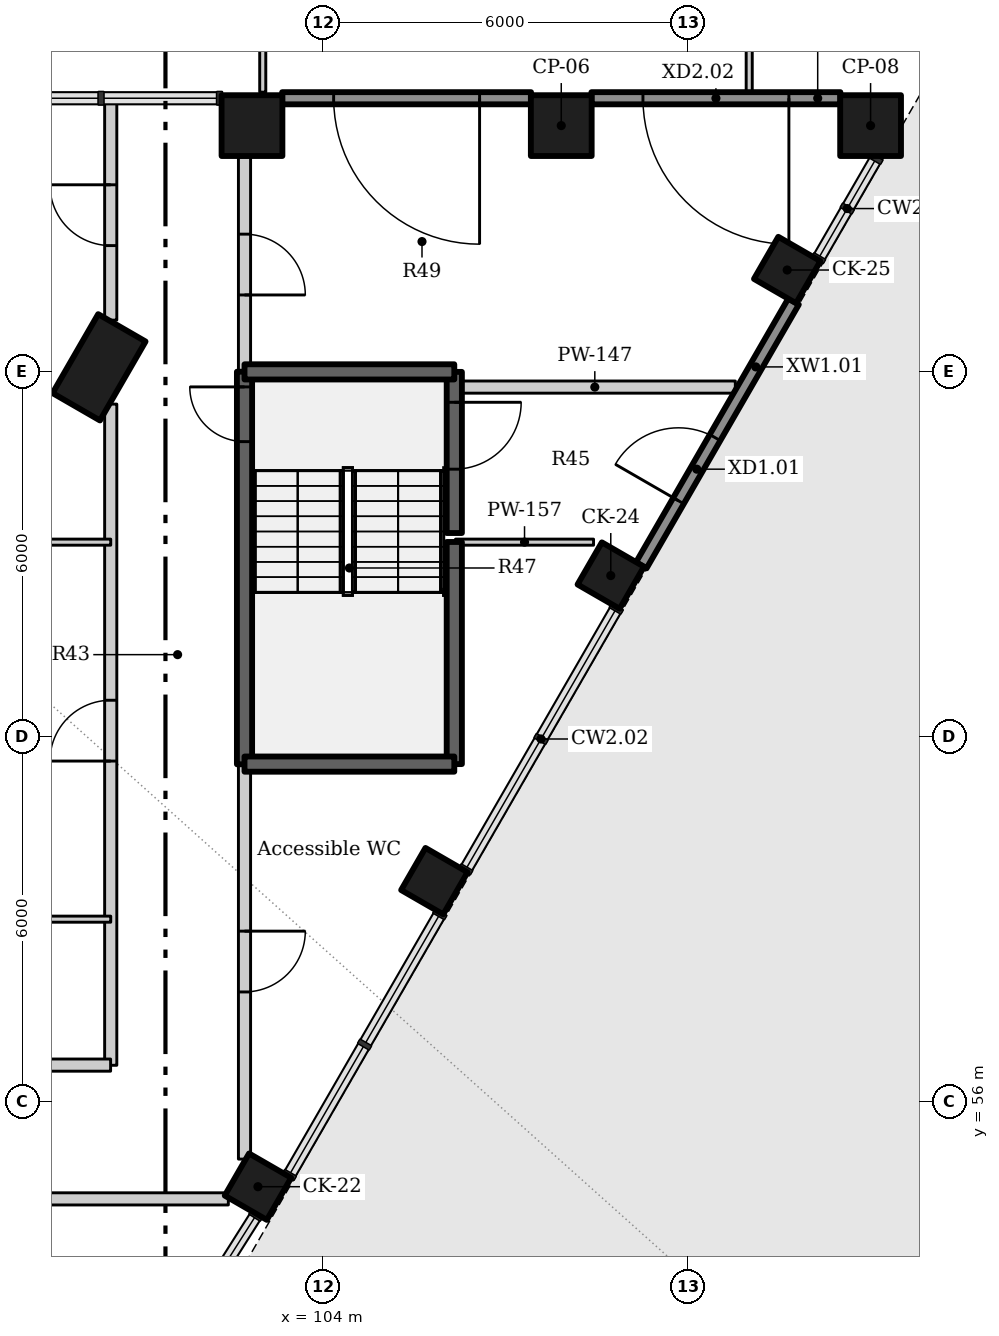
"""IFC4 building model, lengths in metres.
Left out: names, types, materials, properties, quantities, classifications, styles, units other than length and angle.
Written with IfcOpenShell. Run it as: python <this file> out.ifc"""

import sys

from ifc_helpers import new_model, si_unit, direction, frame, frame_2d, origin, origin_2d, place, context, subcontext, project, spatial, rectangle, extrude, element, fill, save


model = new_model("IFC4")
c1 = context("Model", 3, precision=1e-05, world=origin(), true_north=direction((0.0, 1.0)))
c2 = subcontext(c1, "Body", "Model", "MODEL_VIEW")
j1 = project(units=[si_unit("LENGTHUNIT", "METRE"), si_unit("PLANEANGLEUNIT", "RADIAN")], contexts=[c1])
p1 = place(None, origin())
s1 = spatial("IfcSite", under=j1, at=p1, CompositionType="ELEMENT")
p2 = place(p1, origin())
s2 = spatial("IfcBuilding", under=s1, at=p2, CompositionType="ELEMENT")
p3 = place(p2, origin())
s3 = spatial("IfcBuildingStorey", under=s2, at=p3, CompositionType="ELEMENT", Elevation=0.0)
p4 = place(p3, frame((100.308, 68.075, -1.8), z_axis=(0.0, 0.0, 1.0), x_axis=(0.5, 0.866025403784, 0.0)))
e1 = element("IfcColumn", 1, at=p4, inside=s3, PredefinedType="COLUMN", context=c2, shape_type="SweptSolid", body=[
    extrude(rectangle(XDim=1.5, YDim=0.9, at=origin_2d()), origin(), (0.0, 0.0, 1.0), 8.4),
])
for number, where, z_axis, x_axis in (
    (2, (102.921, 54.6, -1.8), (0.0, 0.0, 1.0), (0.5, 0.866, 0.0)),
    (3, (105.822, 59.625, -1.8), (0.0, 0.0, 1.0), (0.5, 0.866, 0.0)),
    (4, (108.723, 64.65, -1.8), (0.0, 0.0, 1.0), (0.5, 0.866, 0.0)),
    (5, (111.625, 69.675, -1.8), (0.0, 0.0, 1.0), (0.5, 0.866, 0.0)),
):
    element("IfcColumn", number, at=place(p3, frame(where, z_axis=z_axis, x_axis=x_axis)), inside=s3, PredefinedType="COLUMN", context=c2, shape_type="SweptSolid", body=[
        extrude(rectangle(XDim=0.8, YDim=0.8, at=origin_2d()), origin(), (0.0, 0.0, 1.0), 8.4),
    ])
for number, where, z_axis, x_axis in (
    (6, (102.823, 72.05, -1.8), (0.0, 0.0, 1.0), (1.0, 0.0, 0.0)),
    (7, (107.909, 72.05, -1.8), (0.0, 0.0, 1.0), (1.0, 0.0, 0.0)),
    (8, (112.996, 72.05, -1.8), (0.0, 0.0, 1.0), (1.0, 0.0, 0.0)),
):
    element("IfcColumn", number, at=place(p3, frame(where, z_axis=z_axis, x_axis=x_axis)), inside=s3, PredefinedType="COLUMN", context=c2, shape_type="SweptSolid", body=[
        extrude(rectangle(XDim=1.0, YDim=1.0, at=origin_2d()), origin(), (0.0, 0.0, 1.0), 8.4),
    ])
p5 = place(p3, frame((109.224, 64.818, 0.0), z_axis=(0.0, 0.0, 1.0), x_axis=(0.499990997566, 0.86603060128, 0.0)))
e9 = element("IfcWall", 9, at=p5, inside=s3, PredefinedType="SOLIDWALL", context=c2, shape_type="SweptSolid", body=[
    extrude(rectangle(XDim=5.01, YDim=0.2, at=frame_2d((2.505, 0.0))), origin(), (0.0, 0.0, 1.0), 5.4),
])
p6 = place(p5, frame((1.227, 0.0, 0.0)))
e10 = element("IfcOpeningElement", 10, at=p6, cuts=e9, PredefinedType="OPENING", context=c2, shape_type="SweptSolid", body=[
    extrude(rectangle(XDim=1.2, YDim=2.4, at=frame_2d((0.6, 1.2))), frame((0.0, 0.11, 0.0), z_axis=(0.0, -1.0, 0.0), x_axis=(1.0, 0.0, 0.0)), (0.0, 0.0, 1.0), 0.22),
])
p7 = place(p3, frame((112.5, 72.5, 0.0), z_axis=(0.0, 0.0, 1.0), x_axis=(-1.0, 0.0, 0.0)))
e11 = element("IfcWall", 11, at=p7, inside=s3, PredefinedType="SOLIDWALL", context=c2, shape_type="SweptSolid", body=[
    extrude(rectangle(XDim=4.095, YDim=0.2, at=frame_2d((2.047, 0.0))), origin(), (0.0, 0.0, 1.0), 5.4),
])
p8 = place(p7, frame((0.847, 0.0, 0.0)))
e12 = element("IfcOpeningElement", 12, at=p8, cuts=e11, PredefinedType="OPENING", context=c2, shape_type="SweptSolid", body=[
    extrude(rectangle(XDim=2.4, YDim=2.7, at=frame_2d((1.2, 1.35))), frame((0.0, 0.11, 0.0), z_axis=(0.0, -1.0, 0.0), x_axis=(1.0, 0.0, 0.0)), (0.0, 0.0, 1.0), 0.22),
])
p9 = place(p3, frame((107.413, 72.5, 0.0), z_axis=(0.0, 0.0, 1.0), x_axis=(-1.0, 0.0, 0.0)))
e13 = element("IfcWall", 13, at=p9, inside=s3, PredefinedType="SOLIDWALL", context=c2, shape_type="SweptSolid", body=[
    extrude(rectangle(XDim=4.094, YDim=0.2, at=frame_2d((2.047, 0.0))), origin(), (0.0, 0.0, 1.0), 5.4),
])
p10 = place(p9, frame((0.847, 0.0, 0.0)))
e14 = element("IfcOpeningElement", 14, at=p10, cuts=e13, PredefinedType="OPENING", context=c2, shape_type="SweptSolid", body=[
    extrude(rectangle(XDim=2.4, YDim=2.7, at=frame_2d((1.2, 1.35))), frame((0.0, 0.11, 0.0), z_axis=(0.0, -1.0, 0.0), x_axis=(1.0, 0.0, 0.0)), (0.0, 0.0, 1.0), 0.22),
])
p11 = place(p3, frame((102.7, 61.547, -1.8), z_axis=(0.0, 0.0, 1.0), x_axis=(0.0, 1.0, 0.0)))
e15 = element("IfcWall", 15, at=p11, inside=s3, PredefinedType="SHEAR", context=c2, shape_type="SweptSolid", body=[
    extrude(rectangle(XDim=6.456, YDim=0.25, at=frame_2d((3.228, 0.0))), origin(), (0.0, 0.0, 1.0), 8.1),
])
p12 = place(p11, frame((5.306, 0.0, 1.8)))
e16 = element("IfcOpeningElement", 16, at=p12, cuts=e15, PredefinedType="OPENING", context=c2, shape_type="SweptSolid", body=[
    extrude(rectangle(XDim=0.9, YDim=2.1, at=frame_2d((0.45, 1.05))), frame((0.0, 0.135, 0.0), z_axis=(0.0, -1.0, 0.0), x_axis=(1.0, 0.0, 0.0)), (0.0, 0.0, 1.0), 0.27),
])
p13 = place(p3, frame((102.7, 61.553, 0.0), z_axis=(0.0, 0.0, 1.0), x_axis=(0.0, -1.0, 0.0)))
e17 = element("IfcWall", 17, at=p13, inside=s3, PredefinedType="PARTITIONING", context=c2, shape_type="SweptSolid", body=[
    extrude(rectangle(XDim=6.499, YDim=0.2, at=frame_2d((3.249, 0.0))), origin(), (0.0, 0.0, 1.0), 6.3),
])
p14 = place(p13, frame((2.75, 0.0, 0.0)))
e18 = element("IfcOpeningElement", 18, at=p14, cuts=e17, PredefinedType="OPENING", context=c2, shape_type="SweptSolid", body=[
    extrude(rectangle(XDim=1.0, YDim=2.1, at=frame_2d((0.5, 1.05))), frame((0.0, 0.11, 0.0), z_axis=(0.0, -1.0, 0.0), x_axis=(1.0, 0.0, 0.0)), (0.0, 0.0, 1.0), 0.22),
])
p15 = place(p3, frame((102.7, 71.533, 0.0), z_axis=(0.0, 0.0, 1.0), x_axis=(0.0, -1.0, 0.0)))
e19 = element("IfcWall", 19, at=p15, inside=s3, PredefinedType="PARTITIONING", context=c2, shape_type="SweptSolid", body=[
    extrude(rectangle(XDim=3.536, YDim=0.2, at=frame_2d((1.768, 0.0))), origin(), (0.0, 0.0, 1.0), 6.3),
])
p16 = place(p15, frame((1.268, 0.0, 0.0)))
e20 = element("IfcOpeningElement", 20, at=p16, cuts=e19, PredefinedType="OPENING", context=c2, shape_type="SweptSolid", body=[
    extrude(rectangle(XDim=1.0, YDim=2.1, at=frame_2d((0.5, 1.05))), frame((0.0, 0.11, 0.0), z_axis=(0.0, -1.0, 0.0), x_axis=(1.0, 0.0, 0.0)), (0.0, 0.0, 1.0), 0.22),
])
p17 = place(p3, frame((100.5, 56.597, 0.0), z_axis=(0.0, 0.0, 1.0), x_axis=(0.0, 1.0, 0.0)))
e21 = element("IfcWall", 21, at=p17, inside=s3, PredefinedType="PARTITIONING", context=c2, shape_type="SweptSolid", body=[
    extrude(rectangle(XDim=10.873, YDim=0.2, at=frame_2d((5.437, 0.0))), origin(), (0.0, 0.0, 1.0), 6.3),
])
p18 = place(p17, frame((5.003, 0.0, 0.0)))
e22 = element("IfcOpeningElement", 22, at=p18, cuts=e21, PredefinedType="OPENING", context=c2, shape_type="SweptSolid", body=[
    extrude(rectangle(XDim=1.0, YDim=2.1, at=frame_2d((0.5, 1.05))), frame((0.0, 0.11, 0.0), z_axis=(0.0, -1.0, 0.0), x_axis=(1.0, 0.0, 0.0)), (0.0, 0.0, 1.0), 0.22),
])
p19 = place(p3, frame((100.5, 68.851, 0.0), z_axis=(0.0, 0.0, 1.0), x_axis=(0.0, 1.0, 0.0)))
e23 = element("IfcWall", 23, at=p19, inside=s3, PredefinedType="PARTITIONING", context=c2, shape_type="SweptSolid", body=[
    extrude(rectangle(XDim=3.569, YDim=0.2, at=frame_2d((1.785, 0.0))), origin(), (0.0, 0.0, 1.0), 5.53),
])
p20 = place(p19, frame((1.226, 0.0, 0.0)))
e24 = element("IfcOpeningElement", 24, at=p20, cuts=e23, PredefinedType="OPENING", context=c2, shape_type="SweptSolid", body=[
    extrude(rectangle(XDim=1.0, YDim=2.1, at=frame_2d((0.5, 1.05))), frame((0.0, 0.11, 0.0), z_axis=(0.0, -1.0, 0.0), x_axis=(1.0, 0.0, 0.0)), (0.0, 0.0, 1.0), 0.22),
])
p21 = place(p3, frame((106.15, 61.55, -1.8), z_axis=(0.0, 0.0, 1.0), x_axis=(0.0, 1.0, 0.0)))
e25 = element("IfcWall", 25, at=p21, inside=s3, PredefinedType="SHEAR", context=c2, shape_type="SweptSolid", body=[
    extrude(rectangle(XDim=3.653, YDim=0.25, at=frame_2d((1.826, 0.0))), origin(), (0.0, 0.0, 1.0), 8.1),
])
p22 = place(p3, frame((106.15, 68.0, -1.8), z_axis=(0.0, 0.0, 1.0), x_axis=(0.0, -1.0, 0.0)))
e26 = element("IfcWall", 26, at=p22, inside=s3, PredefinedType="SHEAR", context=c2, shape_type="SweptSolid", body=[
    extrude(rectangle(XDim=2.65, YDim=0.25, at=frame_2d((1.325, 0.0))), origin(), (0.0, 0.0, 1.0), 8.1),
])
p23 = place(p22, frame((0.5, 0.0, 1.8)))
e27 = element("IfcOpeningElement", 27, at=p23, cuts=e26, PredefinedType="OPENING", context=c2, shape_type="SweptSolid", body=[
    extrude(rectangle(XDim=1.1, YDim=2.1, at=frame_2d((0.55, 1.05))), frame((0.0, 0.135, 0.0), z_axis=(0.0, -1.0, 0.0), x_axis=(1.0, 0.0, 0.0)), (0.0, 0.0, 1.0), 0.27),
])
p24 = place(p3, frame((102.434, 54.4, 0.0), z_axis=(0.0, 0.0, 1.0), x_axis=(-1.0, 0.0, 0.0)))
e28 = element("IfcWall", 28, at=p24, inside=s3, PredefinedType="PARTITIONING", context=c2, shape_type="SweptSolid", body=[
    extrude(rectangle(XDim=20.834, YDim=0.2, at=frame_2d((10.417, 0.0))), origin(), (0.0, 0.0, 1.0), 6.3),
])
p25 = place(p24, frame((8.383, 0.0, 0.0)))
e29 = element("IfcOpeningElement", 29, at=p25, cuts=e28, PredefinedType="OPENING", context=c2, shape_type="SweptSolid", body=[
    extrude(rectangle(XDim=1.0, YDim=2.1, at=frame_2d((0.5, 1.05))), frame((0.0, 0.11, 0.0), z_axis=(0.0, -1.0, 0.0), x_axis=(1.0, 0.0, 0.0)), (0.0, 0.0, 1.0), 0.22),
])
p26 = place(p3, frame((91.274, 56.6, 0.0), z_axis=(0.0, 0.0, 1.0), x_axis=(1.0, 0.0, 0.0)))
e30 = element("IfcWall", 30, at=p26, inside=s3, PredefinedType="PARTITIONING", context=c2, shape_type="SweptSolid", body=[
    extrude(rectangle(XDim=9.224, YDim=0.2, at=frame_2d((4.612, 0.0))), origin(), (0.0, 0.0, 1.0), 6.3),
])
p27 = place(p26, frame((4.114, 0.0, 0.0)))
e31 = element("IfcOpeningElement", 31, at=p27, cuts=e30, PredefinedType="OPENING", context=c2, shape_type="SweptSolid", body=[
    extrude(rectangle(XDim=1.0, YDim=2.1, at=frame_2d((0.5, 1.05))), frame((0.0, 0.11, 0.0), z_axis=(0.0, -1.0, 0.0), x_axis=(1.0, 0.0, 0.0)), (0.0, 0.0, 1.0), 0.22),
])
p28 = place(p3, frame((106.15, 67.75, 0.0), z_axis=(0.0, 0.0, 1.0), x_axis=(1.0, 0.0, 0.0)))
e32 = element("IfcWall", 32, at=p28, inside=s3, PredefinedType="PARTITIONING", context=c2, shape_type="SweptSolid", body=[
    extrude(rectangle(XDim=4.622, YDim=0.2, at=frame_2d((2.311, 0.0))), origin(), (0.0, 0.0, 1.0), 5.53),
])
for number, where, z_axis, x_axis in (
    (33, (102.7, 68.0, -1.8), (0.0, 0.0, 1.0), (1.0, 0.0, 0.0)),
    (34, (102.7, 61.55, -1.8), (0.0, 0.0, 1.0), (1.0, 0.0, 0.0)),
):
    element("IfcWall", number, at=place(p3, frame(where, z_axis=z_axis, x_axis=x_axis)), inside=s3, PredefinedType="SHEAR", context=c2, shape_type="SweptSolid", body=[
        extrude(rectangle(XDim=3.45, YDim=0.25, at=frame_2d((1.725, 0.0))), origin(), (0.0, 0.0, 1.0), 8.1),
    ])
p29 = place(p3, frame((97.68, 65.2, 0.0), z_axis=(0.0, 0.0, 1.0), x_axis=(1.0, 0.0, 0.0)))
e35 = element("IfcWall", 35, at=p29, inside=s3, PredefinedType="PARTITIONING", context=c2, shape_type="SweptSolid", body=[
    extrude(rectangle(XDim=2.82, YDim=0.1, at=frame_2d((1.41, 0.0))), origin(), (0.0, 0.0, 1.0), 5.38),
])
p30 = place(p3, frame((106.17, 65.2, 0.0), z_axis=(0.0, 0.0, 1.0), x_axis=(1.0, 0.0, 0.0)))
e36 = element("IfcWall", 36, at=p30, inside=s3, PredefinedType="PARTITIONING", context=c2, shape_type="SweptSolid", body=[
    extrude(rectangle(XDim=2.27, YDim=0.1, at=frame_2d((1.135, 0.0))), origin(), (0.0, 0.0, 1.0), 6.3),
])
p31 = place(p3, frame((95.612, 59.0, 0.0), z_axis=(0.0, 0.0, 1.0), x_axis=(1.0, 0.0, 0.0)))
e37 = element("IfcWall", 37, at=p31, inside=s3, PredefinedType="PARTITIONING", context=c2, shape_type="SweptSolid", body=[
    extrude(rectangle(XDim=4.888, YDim=0.1, at=frame_2d((2.444, 0.0))), origin(), (0.0, 0.0, 1.0), 6.3),
])
p32 = place(p3, frame((103.0, 87.4, 0.0), z_axis=(0.0, 0.0, 1.0), x_axis=(0.0, -1.0, 0.0)))
e38 = element("IfcWall", 38, at=p32, inside=s3, PredefinedType="PARTITIONING", context=c2, shape_type="SweptSolid", body=[
    extrude(rectangle(XDim=14.8, YDim=0.1, at=frame_2d((7.4, 0.0))), origin(), (0.0, 0.0, 1.0), 6.3),
])
p33 = place(p32, frame((6.65, 0.0, 0.0)))
e39 = element("IfcOpeningElement", 39, at=p33, cuts=e38, PredefinedType="OPENING", context=c2, shape_type="SweptSolid", body=[
    extrude(rectangle(XDim=1.5, YDim=2.1, at=frame_2d((0.75, 1.05))), frame((0.0, 0.06, 0.0), z_axis=(0.0, -1.0, 0.0), x_axis=(1.0, 0.0, 0.0)), (0.0, 0.0, 1.0), 0.12),
])
p34 = place(p3, frame((111.0, 87.4, 0.0), z_axis=(0.0, 0.0, 1.0), x_axis=(0.0, -1.0, 0.0)))
e40 = element("IfcWall", 40, at=p34, inside=s3, PredefinedType="PARTITIONING", context=c2, shape_type="SweptSolid", body=[
    extrude(rectangle(XDim=14.8, YDim=0.1, at=frame_2d((7.4, 0.0))), origin(), (0.0, 0.0, 1.0), 6.3),
])
p35 = place(p34, frame((6.65, 0.0, 0.0)))
e41 = element("IfcOpeningElement", 41, at=p35, cuts=e40, PredefinedType="OPENING", context=c2, shape_type="SweptSolid", body=[
    extrude(rectangle(XDim=1.5, YDim=2.1, at=frame_2d((0.75, 1.05))), frame((0.0, 0.06, 0.0), z_axis=(0.0, -1.0, 0.0), x_axis=(1.0, 0.0, 0.0)), (0.0, 0.0, 1.0), 0.12),
])
p36 = place(p6, frame((1.2, 0.0, 0.0), z_axis=(0.0, 0.0, 1.0), x_axis=(-1.0, 0.0, 0.0)))
e42 = element("IfcDoor", 42, at=p36, inside=s3, OperationType="SINGLE_SWING_LEFT", PredefinedType="DOOR", context=c2, shape_type="SweptSolid", body=[
    extrude(rectangle(XDim=1.2, YDim=2.4, at=frame_2d((0.6, 1.2))), frame((0.0, 0.025, 0.0), z_axis=(0.0, -1.0, 0.0), x_axis=(1.0, 0.0, 0.0)), (0.0, 0.0, 1.0), 0.05),
])
fill(e10, e42)
p37 = place(p8, origin())
e43 = element("IfcDoor", 43, at=p37, inside=s3, OperationType="DOUBLE_DOOR_DOUBLE_SWING", PredefinedType="DOOR", context=c2, shape_type="SweptSolid", body=[
    extrude(rectangle(XDim=2.4, YDim=2.7, at=frame_2d((1.2, 1.35))), frame((0.0, 0.025, 0.0), z_axis=(0.0, -1.0, 0.0), x_axis=(1.0, 0.0, 0.0)), (0.0, 0.0, 1.0), 0.05),
])
fill(e12, e43)
p38 = place(p10, origin())
e44 = element("IfcDoor", 44, at=p38, inside=s3, OperationType="DOUBLE_DOOR_DOUBLE_SWING", PredefinedType="DOOR", context=c2, shape_type="SweptSolid", body=[
    extrude(rectangle(XDim=2.4, YDim=2.7, at=frame_2d((1.2, 1.35))), frame((0.0, 0.025, 0.0), z_axis=(0.0, -1.0, 0.0), x_axis=(1.0, 0.0, 0.0)), (0.0, 0.0, 1.0), 0.05),
])
fill(e14, e44)
p39 = place(p23, origin())
e45 = element("IfcDoor", 45, at=p39, inside=s3, OperationType="SINGLE_SWING_LEFT", PredefinedType="DOOR", context=c2, shape_type="SweptSolid", body=[
    extrude(rectangle(XDim=1.1, YDim=2.1, at=frame_2d((0.55, 1.05))), frame((0.0, 0.025, 0.0), z_axis=(0.0, -1.0, 0.0), x_axis=(1.0, 0.0, 0.0)), (0.0, 0.0, 1.0), 0.05),
])
fill(e27, e45)
p40 = place(p12, origin())
e46 = element("IfcDoor", 46, at=p40, inside=s3, OperationType="SINGLE_SWING_RIGHT", PredefinedType="DOOR", context=c2, shape_type="SweptSolid", body=[
    extrude(rectangle(XDim=0.9, YDim=2.1, at=frame_2d((0.45, 1.05))), frame((0.0, 0.025, 0.0), z_axis=(0.0, -1.0, 0.0), x_axis=(1.0, 0.0, 0.0)), (0.0, 0.0, 1.0), 0.05),
])
fill(e16, e46)
p41 = place(p16, origin())
e47 = element("IfcDoor", 47, at=p41, inside=s3, OperationType="SINGLE_SWING_RIGHT", PredefinedType="DOOR", context=c2, shape_type="SweptSolid", body=[
    extrude(rectangle(XDim=1.0, YDim=2.1, at=frame_2d((0.5, 1.05))), frame((0.0, 0.025, 0.0), z_axis=(0.0, -1.0, 0.0), x_axis=(1.0, 0.0, 0.0)), (0.0, 0.0, 1.0), 0.05),
])
fill(e20, e47)
p42 = place(p14, origin())
e48 = element("IfcDoor", 48, at=p42, inside=s3, OperationType="SINGLE_SWING_LEFT", PredefinedType="DOOR", context=c2, shape_type="SweptSolid", body=[
    extrude(rectangle(XDim=1.0, YDim=2.1, at=frame_2d((0.5, 1.05))), frame((0.0, 0.025, 0.0), z_axis=(0.0, -1.0, 0.0), x_axis=(1.0, 0.0, 0.0)), (0.0, 0.0, 1.0), 0.05),
])
fill(e18, e48)
p43 = place(p20, origin())
e49 = element("IfcDoor", 49, at=p43, inside=s3, OperationType="SINGLE_SWING_RIGHT", PredefinedType="DOOR", context=c2, shape_type="SweptSolid", body=[
    extrude(rectangle(XDim=1.0, YDim=2.1, at=frame_2d((0.5, 1.05))), frame((0.0, 0.025, 0.0), z_axis=(0.0, -1.0, 0.0), x_axis=(1.0, 0.0, 0.0)), (0.0, 0.0, 1.0), 0.05),
])
fill(e24, e49)
p44 = place(p18, origin())
e50 = element("IfcDoor", 50, at=p44, inside=s3, OperationType="SINGLE_SWING_LEFT", PredefinedType="DOOR", context=c2, shape_type="SweptSolid", body=[
    extrude(rectangle(XDim=1.0, YDim=2.1, at=frame_2d((0.5, 1.05))), frame((0.0, 0.025, 0.0), z_axis=(0.0, -1.0, 0.0), x_axis=(1.0, 0.0, 0.0)), (0.0, 0.0, 1.0), 0.05),
])
fill(e22, e50)
save(model, sys.argv[1])
